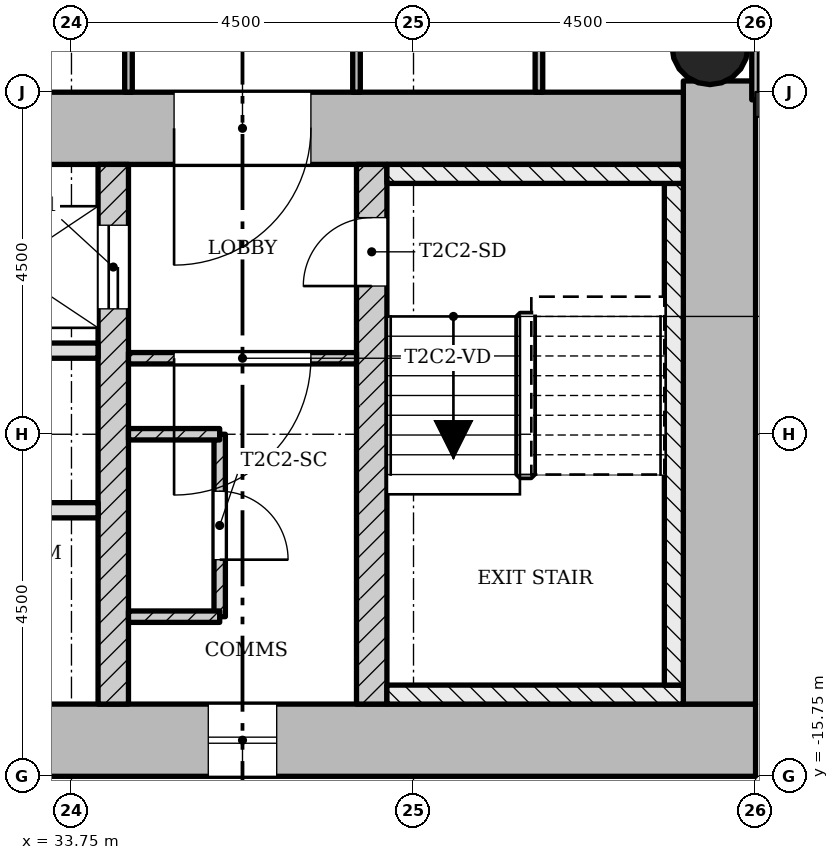
"""IFC4 building model, lengths in metres.
Left out: names, types, materials, properties, quantities, classifications, styles, units other than length and angle.
Written with IfcOpenShell. Run it as: python <this file> out.ifc"""

import sys

from ifc_helpers import new_model, si_unit, direction, frame, frame_2d, origin, origin_2d, place, context, subcontext, project, spatial, rectangle, hollow_circle, extrude, element, fill, save


model = new_model("IFC4")
c1 = context("Model", 3, precision=1e-05, world=origin(), true_north=direction((0.0, 1.0)))
c2 = subcontext(c1, "Body", "Model", "MODEL_VIEW")
j1 = project(units=[si_unit("LENGTHUNIT", "METRE"), si_unit("PLANEANGLEUNIT", "RADIAN")], contexts=[c1])
p1 = place(None, origin())
s1 = spatial("IfcSite", under=j1, at=p1, CompositionType="ELEMENT")
p2 = place(p1, origin())
s2 = spatial("IfcBuilding", under=s1, at=p2, CompositionType="ELEMENT")
p3 = place(p2, frame((0.0, 0.0, 120.8)))
s3 = spatial("IfcBuildingStorey", under=s2, at=p3, CompositionType="ELEMENT", Elevation=120.8)
p4 = place(p3, frame((30.2, -15.275, 0.0), z_axis=(0.0, 0.0, 1.0), x_axis=(1.0, 0.0, 0.0)))
e1 = element("IfcWall", 1, at=p4, inside=s3, PredefinedType="SHEAR", context=c2, shape_type="SweptSolid", body=[
    extrude(rectangle(XDim=12.55, YDim=0.95, at=frame_2d((6.275, 0.0))), origin(), (0.0, 0.0, 1.0), 3.4),
])
p5 = place(p4, frame((5.35, 0.0, 0.45)))
e2 = element("IfcOpeningElement", 2, at=p5, cuts=e1, PredefinedType="OPENING", context=c2, shape_type="SweptSolid", body=[
    extrude(rectangle(XDim=0.9, YDim=2.4, at=frame_2d((0.45, 1.2))), frame((0.0, 0.485, 0.0), z_axis=(0.0, -1.0, 0.0), x_axis=(1.0, 0.0, 0.0)), (0.0, 0.0, 1.0), 0.97),
])
p6 = place(p3, frame((42.275, -14.8, 0.0), z_axis=(0.0, 0.0, 1.0), x_axis=(0.0, 1.0, 0.0)))
e3 = element("IfcWall", 3, at=p6, inside=s3, PredefinedType="SHEAR", context=c2, shape_type="SweptSolid", body=[
    extrude(rectangle(XDim=8.198, YDim=0.95, at=frame_2d((4.099, 0.0))), origin(), (0.0, 0.0, 1.0), 3.4),
])
p7 = place(p3, frame((41.8, -7.225, 0.0), z_axis=(0.0, 0.0, 1.0), x_axis=(-1.0, 0.0, 0.0)))
e4 = element("IfcWall", 4, at=p7, inside=s3, PredefinedType="SHEAR", context=c2, shape_type="SweptSolid", body=[
    extrude(rectangle(XDim=12.55, YDim=0.95, at=frame_2d((6.275, 0.0))), origin(), (0.0, 0.0, 1.0), 3.4),
])
p8 = place(p7, frame((4.9, 0.0, 0.0)))
e5 = element("IfcOpeningElement", 5, at=p8, cuts=e4, PredefinedType="OPENING", context=c2, shape_type="SweptSolid", body=[
    extrude(rectangle(XDim=1.8, YDim=2.1, at=frame_2d((0.9, 1.05))), frame((0.0, 0.485, 0.0), z_axis=(0.0, -1.0, 0.0), x_axis=(1.0, 0.0, 0.0)), (0.0, 0.0, 1.0), 0.97),
])
p9 = place(p3, frame((34.3, -14.8, 0.0), z_axis=(0.0, 0.0, 1.0), x_axis=(0.0, 1.0, 0.0)))
e6 = element("IfcWall", 6, at=p9, inside=s3, PredefinedType="SHEAR", context=c2, shape_type="SweptSolid", body=[
    extrude(rectangle(XDim=7.1, YDim=0.4, at=frame_2d((3.55, 0.0))), origin(), (0.0, 0.0, 1.0), 3.4),
])
p10 = place(p9, frame((5.2, 0.0, 0.0)))
e7 = element("IfcOpeningElement", 7, at=p10, cuts=e6, PredefinedType="OPENING", context=c2, shape_type="SweptSolid", body=[
    extrude(rectangle(XDim=1.1, YDim=2.1, at=frame_2d((0.55, 1.05))), frame((0.0, 0.21, 0.0), z_axis=(0.0, -1.0, 0.0), x_axis=(1.0, 0.0, 0.0)), (0.0, 0.0, 1.0), 0.42),
])
p11 = place(p3, frame((37.7, -14.8, 0.0), z_axis=(0.0, 0.0, 1.0), x_axis=(0.0, 1.0, 0.0)))
e8 = element("IfcWall", 8, at=p11, inside=s3, PredefinedType="SHEAR", context=c2, shape_type="SweptSolid", body=[
    extrude(rectangle(XDim=7.1, YDim=0.4, at=frame_2d((3.55, 0.0))), origin(), (0.0, 0.0, 1.0), 3.4),
])
p12 = place(p11, frame((5.5, 0.0, 0.0)))
e9 = element("IfcOpeningElement", 9, at=p12, cuts=e8, PredefinedType="OPENING", context=c2, shape_type="SweptSolid", body=[
    extrude(rectangle(XDim=0.9, YDim=2.1, at=frame_2d((0.45, 1.05))), frame((0.0, 0.21, 0.0), z_axis=(0.0, -1.0, 0.0), x_axis=(1.0, 0.0, 0.0)), (0.0, 0.0, 1.0), 0.42),
])
p13 = place(p3, frame((42.15, -6.15, 0.0), z_axis=(0.0, 0.0, 1.0), x_axis=(1.0, 0.0, 0.0)))
e10 = element("IfcColumn", 10, at=p13, inside=s3, PredefinedType="COLUMN", context=c2, shape_type="SweptSolid", body=[
    extrude(hollow_circle(Radius=0.5, WallThickness=0.036, at=origin_2d()), origin(), (0.0, 0.0, 1.0), 3.4),
])
p14 = place(p3, frame((34.5, -10.25, 0.0), z_axis=(0.0, 0.0, 1.0), x_axis=(1.0, 0.0, 0.0)))
e11 = element("IfcWall", 11, at=p14, inside=s3, PredefinedType="PARTITIONING", context=c2, shape_type="SweptSolid", body=[
    extrude(rectangle(XDim=3.0, YDim=0.15, at=frame_2d((1.5, 0.0))), origin(), (0.0, 0.0, 1.0), 3.0),
])
p15 = place(p14, frame((0.6, 0.0, 0.0)))
e12 = element("IfcOpeningElement", 12, at=p15, cuts=e11, PredefinedType="OPENING", context=c2, shape_type="SweptSolid", body=[
    extrude(rectangle(XDim=1.8, YDim=2.1, at=frame_2d((0.9, 1.05))), frame((0.0, 0.085, 0.0), z_axis=(0.0, -1.0, 0.0), x_axis=(1.0, 0.0, 0.0)), (0.0, 0.0, 1.0), 0.17),
])
for number, where, z_axis, x_axis in (
    (13, (30.2, -10.15, 0.0), (0.0, 0.0, 1.0), (1.0, 0.0, 0.0)),
    (14, (30.2, -12.25, 0.0), (0.0, 0.0, 1.0), (1.0, 0.0, 0.0)),
):
    element("IfcWall", number, at=place(p3, frame(where, z_axis=z_axis, x_axis=x_axis)), inside=s3, PredefinedType="SOLIDWALL", context=c2, shape_type="SweptSolid", body=[
        extrude(rectangle(XDim=3.9, YDim=0.2, at=frame_2d((1.95, 0.0))), origin(), (0.0, 0.0, 1.0), 3.0),
    ])
p16 = place(p3, frame((35.7, -11.25, 0.0), z_axis=(0.0, 0.0, 1.0), x_axis=(0.0, -1.0, 0.0)))
e15 = element("IfcWall", 15, at=p16, inside=s3, PredefinedType="PARTITIONING", context=c2, shape_type="SweptSolid", body=[
    extrude(rectangle(XDim=2.4, YDim=0.15, at=frame_2d((1.2, 0.0))), origin(), (0.0, 0.0, 1.0), 3.0),
])
p17 = place(p16, frame((0.75, 0.0, 0.0)))
e16 = element("IfcOpeningElement", 16, at=p17, cuts=e15, PredefinedType="OPENING", context=c2, shape_type="SweptSolid", body=[
    extrude(rectangle(XDim=0.9, YDim=2.1, at=frame_2d((0.45, 1.05))), frame((0.0, 0.085, 0.0), z_axis=(0.0, -1.0, 0.0), x_axis=(1.0, 0.0, 0.0)), (0.0, 0.0, 1.0), 0.17),
])
for number, where, z_axis, x_axis in (
    (17, (35.7, -11.25, 0.0), (0.0, 0.0, 1.0), (-1.0, 0.0, 0.0)),
    (18, (35.7, -13.65, 0.0), (0.0, 0.0, 1.0), (-1.0, 0.0, 0.0)),
):
    element("IfcWall", number, at=place(p3, frame(where, z_axis=z_axis, x_axis=x_axis)), inside=s3, PredefinedType="PARTITIONING", context=c2, shape_type="SweptSolid", body=[
        extrude(rectangle(XDim=1.2, YDim=0.15, at=frame_2d((0.6, 0.0))), origin(), (0.0, 0.0, 1.0), 3.0),
    ])
p18 = place(p3, frame((42.75, -6.85, 0.0), z_axis=(0.0, 0.0, 1.0), x_axis=(0.0, 1.0, 0.0)))
e19 = element("IfcWall", 19, at=p18, inside=s3, PredefinedType="PARTITIONING", context=c2, shape_type="SweptSolid", body=[
    extrude(rectangle(XDim=5.95, YDim=0.1, at=frame_2d((2.975, 0.0))), origin(), (0.0, 0.0, 1.0), 3.0),
])
p19 = place(p3, frame((39.9, -6.75, 0.0), z_axis=(0.0, 0.0, 1.0), x_axis=(0.0, 1.0, 0.0)))
e20 = element("IfcWall", 20, at=p19, inside=s3, PredefinedType="PARTITIONING", context=c2, shape_type="SweptSolid", body=[
    extrude(rectangle(XDim=5.85, YDim=0.1, at=frame_2d((2.925, 0.0))), origin(), (0.0, 0.0, 1.0), 3.0),
])
p20 = place(p3, frame((37.5, -6.75, 0.0), z_axis=(0.0, 0.0, 1.0), x_axis=(0.0, 1.0, 0.0)))
e21 = element("IfcWall", 21, at=p20, inside=s3, PredefinedType="PARTITIONING", context=c2, shape_type="SweptSolid", body=[
    extrude(rectangle(XDim=5.85, YDim=0.1, at=frame_2d((2.925, 0.0))), origin(), (0.0, 0.0, 1.0), 3.0),
])
p21 = place(p20, frame((1.575, 0.0, 0.0)))
e22 = element("IfcOpeningElement", 22, at=p21, cuts=e21, PredefinedType="OPENING", context=c2, shape_type="SweptSolid", body=[
    extrude(rectangle(XDim=0.9, YDim=2.1, at=frame_2d((0.45, 1.05))), frame((0.0, 0.06, 0.0), z_axis=(0.0, -1.0, 0.0), x_axis=(1.0, 0.0, 0.0)), (0.0, 0.0, 1.0), 0.12),
])
p22 = place(p3, frame((34.5, -6.75, 0.0), z_axis=(0.0, 0.0, 1.0), x_axis=(0.0, 1.0, 0.0)))
e23 = element("IfcWall", 23, at=p22, inside=s3, PredefinedType="PARTITIONING", context=c2, shape_type="SweptSolid", body=[
    extrude(rectangle(XDim=5.85, YDim=0.1, at=frame_2d((2.925, 0.0))), origin(), (0.0, 0.0, 1.0), 3.0),
])
p23 = place(p22, frame((2.475, 0.0, 0.0)))
e24 = element("IfcOpeningElement", 24, at=p23, cuts=e23, PredefinedType="OPENING", context=c2, shape_type="SweptSolid", body=[
    extrude(rectangle(XDim=0.9, YDim=2.1, at=frame_2d((0.45, 1.05))), frame((0.0, 0.06, 0.0), z_axis=(0.0, -1.0, 0.0), x_axis=(1.0, 0.0, 0.0)), (0.0, 0.0, 1.0), 0.12),
])
p24 = place(p3, frame((37.9, -14.675, 0.0), z_axis=(0.0, 0.0, 1.0), x_axis=(1.0, 0.0, 0.0)))
e25 = element("IfcWall", 25, at=p24, inside=s3, PredefinedType="SHEAR", context=c2, shape_type="SweptSolid", body=[
    extrude(rectangle(XDim=3.9, YDim=0.25, at=frame_2d((1.95, 0.0))), origin(), (0.0, 0.0, 1.0), 3.4),
])
p25 = place(p3, frame((41.675, -7.95, 0.0), z_axis=(0.0, 0.0, 1.0), x_axis=(0.0, -1.0, 0.0)))
e26 = element("IfcWall", 26, at=p25, inside=s3, PredefinedType="SHEAR", context=c2, shape_type="SweptSolid", body=[
    extrude(rectangle(XDim=6.6, YDim=0.25, at=frame_2d((3.3, 0.0))), origin(), (0.0, 0.0, 1.0), 3.4),
])
p26 = place(p3, frame((37.9, -7.825, 0.0), z_axis=(0.0, 0.0, 1.0), x_axis=(1.0, 0.0, 0.0)))
e27 = element("IfcWall", 27, at=p26, inside=s3, PredefinedType="SHEAR", context=c2, shape_type="SweptSolid", body=[
    extrude(rectangle(XDim=3.9, YDim=0.25, at=frame_2d((1.95, 0.0))), origin(), (0.0, 0.0, 1.0), 3.4),
])
p27 = place(p5, origin())
e28 = element("IfcWindow", 28, at=p27, inside=s3, PartitioningType="SINGLE_PANEL", PredefinedType="WINDOW", context=c2, shape_type="SweptSolid", body=[
    extrude(rectangle(XDim=0.9, YDim=2.4, at=frame_2d((0.45, 1.2))), frame((0.0, 0.03, 0.0), z_axis=(0.0, -1.0, 0.0), x_axis=(1.0, 0.0, 0.0)), (0.0, 0.0, 1.0), 0.06),
])
fill(e2, e28)
p28 = place(p15, origin())
e29 = element("IfcDoor", 29, at=p28, inside=s3, OperationType="SINGLE_SWING_LEFT", PredefinedType="DOOR", context=c2, shape_type="SweptSolid", body=[
    extrude(rectangle(XDim=1.8, YDim=2.1, at=frame_2d((0.9, 1.05))), frame((0.0, 0.025, 0.0), z_axis=(0.0, -1.0, 0.0), x_axis=(1.0, 0.0, 0.0)), (0.0, 0.0, 1.0), 0.05),
])
fill(e12, e29)
p29 = place(p17, origin())
e30 = element("IfcDoor", 30, at=p29, inside=s3, OperationType="SINGLE_SWING_LEFT", PredefinedType="DOOR", context=c2, shape_type="SweptSolid", body=[
    extrude(rectangle(XDim=0.9, YDim=2.1, at=frame_2d((0.45, 1.05))), frame((0.0, 0.025, 0.0), z_axis=(0.0, -1.0, 0.0), x_axis=(1.0, 0.0, 0.0)), (0.0, 0.0, 1.0), 0.05),
])
fill(e16, e30)
p30 = place(p12, origin())
e31 = element("IfcDoor", 31, at=p30, inside=s3, OperationType="SINGLE_SWING_RIGHT", PredefinedType="DOOR", context=c2, shape_type="SweptSolid", body=[
    extrude(rectangle(XDim=0.9, YDim=2.1, at=frame_2d((0.45, 1.05))), frame((0.0, 0.025, 0.0), z_axis=(0.0, -1.0, 0.0), x_axis=(1.0, 0.0, 0.0)), (0.0, 0.0, 1.0), 0.05),
])
fill(e9, e31)
p31 = place(p10, origin())
e32 = element("IfcDoor", 32, at=p31, inside=s3, OperationType="SLIDING_TO_LEFT", PredefinedType="DOOR", context=c2, shape_type="SweptSolid", body=[
    extrude(rectangle(XDim=1.1, YDim=2.1, at=frame_2d((0.55, 1.05))), frame((0.0, 0.025, 0.0), z_axis=(0.0, -1.0, 0.0), x_axis=(1.0, 0.0, 0.0)), (0.0, 0.0, 1.0), 0.05),
])
fill(e7, e32)
p32 = place(p8, origin())
e33 = element("IfcDoor", 33, at=p32, inside=s3, OperationType="SINGLE_SWING_LEFT", PredefinedType="DOOR", context=c2, shape_type="SweptSolid", body=[
    extrude(rectangle(XDim=1.8, YDim=2.1, at=frame_2d((0.9, 1.05))), frame((0.0, 0.025, 0.0), z_axis=(0.0, -1.0, 0.0), x_axis=(1.0, 0.0, 0.0)), (0.0, 0.0, 1.0), 0.05),
])
fill(e5, e33)
save(model, sys.argv[1])
